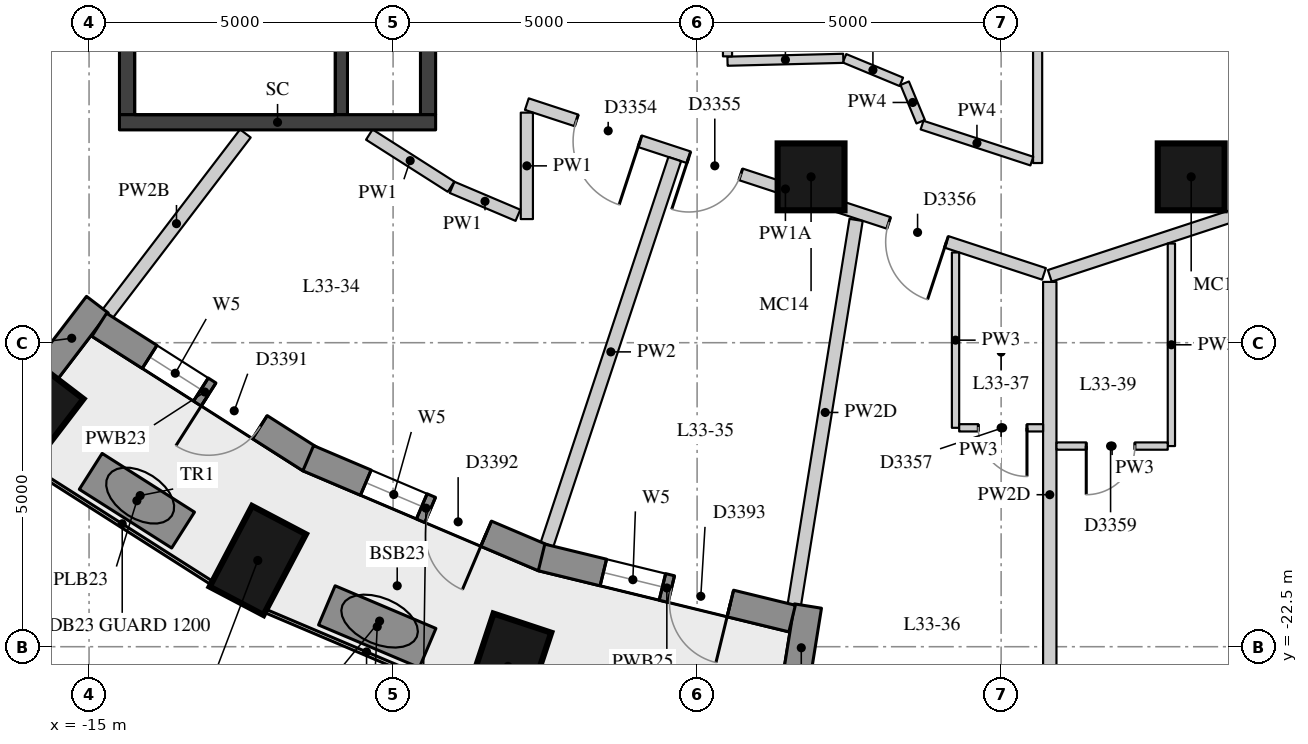
"""IFC4 building model, lengths in metres.
Left out: names, types, materials, properties, quantities, classifications, styles, units other than length and angle.
Written with IfcOpenShell. Run it as: python <this file> out.ifc"""

import sys

from ifc_helpers import new_model, si_unit, direction, frame, frame_2d, origin, origin_2d, place, context, subcontext, project, spatial, rectangle, extrude, element, fill, save


model = new_model("IFC4")
c1 = context("Model", 3, precision=1e-05, world=origin(), true_north=direction((0.0, 1.0)))
c2 = subcontext(c1, "Body", "Model", "MODEL_VIEW")
j1 = project(units=[si_unit("LENGTHUNIT", "METRE"), si_unit("PLANEANGLEUNIT", "RADIAN")], contexts=[c1])
p1 = place(None, origin())
s1 = spatial("IfcSite", under=j1, at=p1, CompositionType="ELEMENT")
p2 = place(p1, origin())
s2 = spatial("IfcBuilding", under=s1, at=p2, CompositionType="ELEMENT")
p3 = place(p2, frame((0.0, 0.0, 118.6)))
s3 = spatial("IfcBuildingStorey", under=s2, at=p3, CompositionType="ELEMENT", Elevation=118.6)
for number, where, z_axis, x_axis in (
    (1, (-15.945, -18.717, 0.0), (0.0, 0.0, 1.0), (-0.607, -0.795, 0.0)),
    (2, (-12.225, -21.082, 0.0), (0.0, 0.0, 1.0), (-0.465, -0.885, 0.0)),
    (3, (-8.11, -22.824, 0.0), (0.0, 0.0, 1.0), (-0.315, -0.949, 0.0)),
):
    element("IfcColumn", number, at=place(p3, frame(where, z_axis=z_axis, x_axis=x_axis)), inside=s3, PredefinedType="COLUMN", context=c2, shape_type="SweptSolid", body=[
        extrude(rectangle(XDim=1.5, YDim=1.0, at=origin_2d()), origin(), (0.0, 0.0, 1.0), 3.3),
    ])
for number, where, z_axis, x_axis in (
    (4, (-3.126, -14.772, 0.0), (0.0, 0.0, 1.0), (1.0, 0.0, 0.0)),
    (5, (3.126, -14.772, 0.0), (0.0, 0.0, 1.0), (1.0, 0.0, 0.0)),
):
    element("IfcColumn", number, at=place(p3, frame(where, z_axis=z_axis, x_axis=x_axis)), inside=s3, PredefinedType="COLUMN", context=c2, shape_type="SweptSolid", body=[
        extrude(rectangle(XDim=1.1, YDim=1.1, at=origin_2d()), origin(), (0.0, 0.0, 1.0), 3.3),
    ])
p4 = place(p3, frame((-15.708, -17.979, 0.0), z_axis=(0.0, 0.0, 1.0), x_axis=(0.607026495834, 0.794681592435, 0.0)))
e6 = element("IfcWall", 6, at=p4, inside=s3, PredefinedType="SOLIDWALL", context=c2, shape_type="SweptSolid", body=[
    extrude(rectangle(XDim=1.391, YDim=0.45, at=frame_2d((0.695, 0.0))), origin(), (0.0, 0.0, 1.0), 2.57),
])
p5 = place(p3, frame((-3.397, -23.204, 0.0), z_axis=(0.0, 0.0, 1.0), x_axis=(0.158415168535, 0.987372591466, 0.0)))
e7 = element("IfcWall", 7, at=p5, inside=s3, PredefinedType="SOLIDWALL", context=c2, shape_type="SweptSolid", body=[
    extrude(rectangle(XDim=1.39, YDim=0.45, at=frame_2d((0.695, 0.0))), origin(), (0.0, 0.0, 1.0), 2.47),
])
p6 = place(p3, frame((-14.833, -17.205, 0.0), z_axis=(0.0, 0.0, 1.0), x_axis=(0.843255766903, -0.537512522259, 0.0)))
e8 = element("IfcWall", 8, at=p6, inside=s3, PredefinedType="SOLIDWALL", context=c2, shape_type="SweptSolid", body=[
    extrude(rectangle(XDim=4.115, YDim=0.45, at=frame_2d((2.058, 0.0))), origin(), (0.0, 0.0, 1.0), 3.02),
])
p7 = place(p6, frame((0.983, 0.0, 0.4)))
e9 = element("IfcOpeningElement", 9, at=p7, cuts=e8, PredefinedType="OPENING", context=c2, shape_type="SweptSolid", body=[
    extrude(rectangle(XDim=1.0, YDim=1.75, at=frame_2d((0.5, 0.875))), frame((0.0, 0.235, 0.0), z_axis=(0.0, -1.0, 0.0), x_axis=(1.0, 0.0, 0.0)), (0.0, 0.0, 1.0), 0.47),
])
p8 = place(p6, frame((2.133, 0.0, 0.0)))
e10 = element("IfcOpeningElement", 10, at=p8, cuts=e8, PredefinedType="OPENING", context=c2, shape_type="SweptSolid", body=[
    extrude(rectangle(XDim=1.0, YDim=2.15, at=frame_2d((0.5, 1.075))), frame((0.0, 0.235, 0.0), z_axis=(0.0, -1.0, 0.0), x_axis=(1.0, 0.0, 0.0)), (0.0, 0.0, 1.0), 0.47),
])
p9 = place(p3, frame((-11.396, -19.399, 0.0), z_axis=(0.0, 0.0, 1.0), x_axis=(0.920496400713, -0.390751041296, 0.0)))
e11 = element("IfcWall", 11, at=p9, inside=s3, PredefinedType="SOLIDWALL", context=c2, shape_type="SweptSolid", body=[
    extrude(rectangle(XDim=4.207, YDim=0.45, at=frame_2d((2.104, 0.0))), origin(), (0.0, 0.0, 1.0), 3.02),
])
p10 = place(p9, frame((1.028, 0.0, 0.4)))
e12 = element("IfcOpeningElement", 12, at=p10, cuts=e11, PredefinedType="OPENING", context=c2, shape_type="SweptSolid", body=[
    extrude(rectangle(XDim=1.0, YDim=1.75, at=frame_2d((0.5, 0.875))), frame((0.0, 0.235, 0.0), z_axis=(0.0, -1.0, 0.0), x_axis=(1.0, 0.0, 0.0)), (0.0, 0.0, 1.0), 0.47),
])
p11 = place(p9, frame((2.178, 0.0, 0.0)))
e13 = element("IfcOpeningElement", 13, at=p11, cuts=e11, PredefinedType="OPENING", context=c2, shape_type="SweptSolid", body=[
    extrude(rectangle(XDim=1.0, YDim=2.15, at=frame_2d((0.5, 1.075))), frame((0.0, 0.235, 0.0), z_axis=(0.0, -1.0, 0.0), x_axis=(1.0, 0.0, 0.0)), (0.0, 0.0, 1.0), 0.47),
])
p12 = place(p3, frame((-7.558, -21.032, 0.0), z_axis=(0.0, 0.0, 1.0), x_axis=(0.971511611373, -0.23699195971, 0.0)))
e14 = element("IfcWall", 14, at=p12, inside=s3, PredefinedType="SOLIDWALL", context=c2, shape_type="SweptSolid", body=[
    extrude(rectangle(XDim=4.241, YDim=0.45, at=frame_2d((2.121, 0.0))), origin(), (0.0, 0.0, 1.0), 3.02),
])
p13 = place(p12, frame((1.046, 0.0, 0.4)))
e15 = element("IfcOpeningElement", 15, at=p13, cuts=e14, PredefinedType="OPENING", context=c2, shape_type="SweptSolid", body=[
    extrude(rectangle(XDim=1.0, YDim=1.75, at=frame_2d((0.5, 0.875))), frame((0.0, 0.235, 0.0), z_axis=(0.0, -1.0, 0.0), x_axis=(1.0, 0.0, 0.0)), (0.0, 0.0, 1.0), 0.47),
])
p14 = place(p12, frame((2.196, 0.0, 0.0)))
e16 = element("IfcOpeningElement", 16, at=p14, cuts=e14, PredefinedType="OPENING", context=c2, shape_type="SweptSolid", body=[
    extrude(rectangle(XDim=1.0, YDim=2.15, at=frame_2d((0.5, 1.075))), frame((0.0, 0.235, 0.0), z_axis=(0.0, -1.0, 0.0), x_axis=(1.0, 0.0, 0.0)), (0.0, 0.0, 1.0), 0.47),
])
for number, where, z_axis, x_axis in (
    (17, (-14.973, -19.616, 0.0), (0.0, 0.0, 1.0), (0.844, -0.537, 0.0)),
    (18, (-11.09, -21.82, 0.0), (0.0, 0.0, 1.0), (0.921, -0.39, 0.0)),
):
    element("IfcWall", number, at=place(p3, frame(where, z_axis=z_axis, x_axis=x_axis)), inside=s3, PredefinedType="USERDEFINED", context=c2, shape_type="SweptSolid", body=[
        extrude(rectangle(XDim=1.8, YDim=0.7, at=frame_2d((0.9, 0.0))), origin(), (0.0, 0.0, 1.0), 0.75),
    ])
p15 = place(p3, frame((-10.85, -13.75, 0.0), z_axis=(0.0, 0.0, 1.0), x_axis=(0.0, 1.0, 0.0)))
e19 = element("IfcWall", 19, at=p15, inside=s3, PredefinedType="SHEAR", context=c2, shape_type="SweptSolid", body=[
    extrude(rectangle(XDim=6.0, YDim=0.2, at=frame_2d((3.0, 0.0))), origin(), (0.0, 0.0, 1.0), 3.02),
])
p16 = place(p15, frame((4.4, 0.0, 0.0)))
e20 = element("IfcOpeningElement", 20, at=p16, cuts=e19, PredefinedType="OPENING", context=c2, shape_type="SweptSolid", body=[
    extrude(rectangle(XDim=1.5, YDim=2.1, at=frame_2d((0.75, 1.05))), frame((0.0, 0.11, 0.0), z_axis=(0.0, -1.0, 0.0), x_axis=(1.0, 0.0, 0.0)), (0.0, 0.0, 1.0), 0.22),
])
p17 = place(p3, frame((-14.375, -13.75, -0.28), z_axis=(0.0, 0.0, 1.0), x_axis=(0.0, 1.0, 0.0)))
e21 = element("IfcWall", 21, at=p17, inside=s3, PredefinedType="SHEAR", context=c2, shape_type="SweptSolid", body=[
    extrude(rectangle(XDim=6.0, YDim=0.25, at=frame_2d((3.0, 0.0))), origin(), (0.0, 0.0, 1.0), 3.3),
])
p18 = place(p3, frame((-9.425, -13.75, -0.28), z_axis=(0.0, 0.0, 1.0), x_axis=(0.0, 1.0, 0.0)))
e22 = element("IfcWall", 22, at=p18, inside=s3, PredefinedType="SHEAR", context=c2, shape_type="SweptSolid", body=[
    extrude(rectangle(XDim=6.0, YDim=0.25, at=frame_2d((3.0, 0.0))), origin(), (0.0, 0.0, 1.0), 3.3),
])
p19 = place(p18, frame((2.4, 0.0, 0.28)))
e23 = element("IfcOpeningElement", 23, at=p19, cuts=e22, PredefinedType="OPENING", context=c2, shape_type="SweptSolid", body=[
    extrude(rectangle(XDim=1.5, YDim=2.1, at=frame_2d((0.75, 1.05))), frame((0.0, 0.135, 0.0), z_axis=(0.0, -1.0, 0.0), x_axis=(1.0, 0.0, 0.0)), (0.0, 0.0, 1.0), 0.27),
])
p20 = place(p3, frame((-14.5, -13.875, -0.28), z_axis=(0.0, 0.0, 1.0), x_axis=(1.0, 0.0, 0.0)))
e24 = element("IfcWall", 24, at=p20, inside=s3, PredefinedType="SHEAR", context=c2, shape_type="SweptSolid", body=[
    extrude(rectangle(XDim=5.2, YDim=0.25, at=frame_2d((2.6, 0.0))), origin(), (0.0, 0.0, 1.0), 3.3),
])
p21 = place(p3, frame((8.984, -13.713, 0.0), z_axis=(0.0, 0.0, 1.0), x_axis=(-0.950093687873, -0.311964716378, 0.0)))
e25 = element("IfcWall", 25, at=p21, inside=s3, PredefinedType="PARTITIONING", context=c2, shape_type="SweptSolid", body=[
    extrude(rectangle(XDim=8.614, YDim=0.2, at=frame_2d((4.307, 0.0))), origin(), (0.0, 0.0, 1.0), 3.02),
])
p22 = place(p21, frame((3.82, 0.0, 0.0)))
e26 = element("IfcOpeningElement", 26, at=p22, cuts=e25, PredefinedType="OPENING", context=c2, shape_type="SweptSolid", body=[
    extrude(rectangle(XDim=1.1, YDim=2.1, at=frame_2d((0.55, 1.05))), frame((0.0, 0.11, 0.0), z_axis=(0.0, -1.0, 0.0), x_axis=(1.0, 0.0, 0.0)), (0.0, 0.0, 1.0), 0.22),
])
p23 = place(p21, frame((0.22, 0.0, 0.0)))
e27 = element("IfcOpeningElement", 27, at=p23, cuts=e25, PredefinedType="OPENING", context=c2, shape_type="SweptSolid", body=[
    extrude(rectangle(XDim=1.1, YDim=2.1, at=frame_2d((0.55, 1.05))), frame((0.0, 0.11, 0.0), z_axis=(0.0, -1.0, 0.0), x_axis=(1.0, 0.0, 0.0)), (0.0, 0.0, 1.0), 0.22),
])
p24 = place(p3, frame((0.705, -16.368, 0.0), z_axis=(0.0, 0.0, 1.0), x_axis=(-0.95010544032, 0.311928921832, 0.0)))
e28 = element("IfcWall", 28, at=p24, inside=s3, PredefinedType="PARTITIONING", context=c2, shape_type="SweptSolid", body=[
    extrude(rectangle(XDim=8.951, YDim=0.2, at=frame_2d((4.476, 0.0))), origin(), (0.0, 0.0, 1.0), 2.57),
])
p25 = place(p24, frame((6.993, 0.0, 0.0)))
e29 = element("IfcOpeningElement", 29, at=p25, cuts=e28, PredefinedType="OPENING", context=c2, shape_type="SweptSolid", body=[
    extrude(rectangle(XDim=1.1, YDim=2.1, at=frame_2d((0.55, 1.05))), frame((0.0, 0.11, 0.0), z_axis=(0.0, -1.0, 0.0), x_axis=(1.0, 0.0, 0.0)), (0.0, 0.0, 1.0), 0.22),
])
p26 = place(p24, frame((5.248, 0.0, 0.0)))
e30 = element("IfcOpeningElement", 30, at=p26, cuts=e28, PredefinedType="OPENING", context=c2, shape_type="SweptSolid", body=[
    extrude(rectangle(XDim=0.9, YDim=2.1, at=frame_2d((0.45, 1.05))), frame((0.0, 0.11, 0.0), z_axis=(0.0, -1.0, 0.0), x_axis=(1.0, 0.0, 0.0)), (0.0, 0.0, 1.0), 0.22),
])
p27 = place(p24, frame((1.688, 0.0, 0.0)))
e31 = element("IfcOpeningElement", 31, at=p27, cuts=e28, PredefinedType="OPENING", context=c2, shape_type="SweptSolid", body=[
    extrude(rectangle(XDim=1.0, YDim=2.1, at=frame_2d((0.5, 1.05))), frame((0.0, 0.11, 0.0), z_axis=(0.0, -1.0, 0.0), x_axis=(1.0, 0.0, 0.0)), (0.0, 0.0, 1.0), 0.22),
])
p28 = place(p3, frame((-7.8, -13.716, 0.0), z_axis=(0.0, 0.0, 1.0), x_axis=(0.0, -1.0, 0.0)))
e32 = element("IfcWall", 32, at=p28, inside=s3, PredefinedType="PARTITIONING", context=c2, shape_type="SweptSolid", body=[
    extrude(rectangle(XDim=1.751, YDim=0.2, at=frame_2d((0.875, 0.0))), origin(), (0.0, 0.0, 1.0), 3.02),
])
p29 = place(p3, frame((-7.947, -15.404, 0.0), z_axis=(0.0, 0.0, 1.0), x_axis=(-0.920608906038, 0.390485905153, 0.0)))
e33 = element("IfcWall", 33, at=p29, inside=s3, PredefinedType="PARTITIONING", context=c2, shape_type="SweptSolid", body=[
    extrude(rectangle(XDim=1.177, YDim=0.2, at=frame_2d((0.588, 0.0))), origin(), (0.0, 0.0, 1.0), 3.02),
])
p30 = place(p3, frame((-9.047, -14.934, 0.0), z_axis=(0.0, 0.0, 1.0), x_axis=(-0.843232404468, 0.537549171755, 0.0)))
e34 = element("IfcWall", 34, at=p30, inside=s3, PredefinedType="PARTITIONING", context=c2, shape_type="SweptSolid", body=[
    extrude(rectangle(XDim=1.594, YDim=0.2, at=frame_2d((0.797, 0.0))), origin(), (0.0, 0.0, 1.0), 3.02),
])
p31 = place(p3, frame((0.6, -9.23, 0.0), z_axis=(0.0, 0.0, 1.0), x_axis=(0.0, -1.0, 0.0)))
e35 = element("IfcWall", 35, at=p31, inside=s3, PredefinedType="PARTITIONING", context=c2, shape_type="SweptSolid", body=[
    extrude(rectangle(XDim=5.315, YDim=0.15, at=frame_2d((2.657, 0.0))), origin(), (0.0, 0.0, 1.0), 3.02),
])
p32 = place(p3, frame((0.505, -14.513, 0.0), z_axis=(0.0, 0.0, 1.0), x_axis=(-0.950175898888, 0.31171422998, 0.0)))
e36 = element("IfcWall", 36, at=p32, inside=s3, PredefinedType="PARTITIONING", context=c2, shape_type="SweptSolid", body=[
    extrude(rectangle(XDim=1.9, YDim=0.15, at=frame_2d((0.95, 0.0))), origin(), (0.0, 0.0, 1.0), 3.02),
])
p33 = place(p3, frame((-1.323, -13.865, 0.0), z_axis=(0.0, 0.0, 1.0), x_axis=(-0.382970536008, 0.923760558018, 0.0)))
e37 = element("IfcWall", 37, at=p33, inside=s3, PredefinedType="PARTITIONING", context=c2, shape_type="SweptSolid", body=[
    extrude(rectangle(XDim=0.685, YDim=0.15, at=frame_2d((0.343, 0.0))), origin(), (0.0, 0.0, 1.0), 3.02),
])
p34 = place(p3, frame((-1.641, -13.209, 0.0), z_axis=(0.0, 0.0, 1.0), x_axis=(-0.923725449546, 0.383055209937, 0.0)))
e38 = element("IfcWall", 38, at=p34, inside=s3, PredefinedType="PARTITIONING", context=c2, shape_type="SweptSolid", body=[
    extrude(rectangle(XDim=1.011, YDim=0.15, at=frame_2d((0.506, 0.0))), origin(), (0.0, 0.0, 1.0), 3.02),
])
p35 = place(p3, frame((-2.596, -12.823, 0.0), z_axis=(0.0, 0.0, 1.0), x_axis=(-0.999684436087, -0.025120275573, 0.0)))
e39 = element("IfcWall", 39, at=p35, inside=s3, PredefinedType="PARTITIONING", context=c2, shape_type="SweptSolid", body=[
    extrude(rectangle(XDim=1.905, YDim=0.15, at=frame_2d((0.952, 0.0))), origin(), (0.0, 0.0, 1.0), 3.02),
])
p36 = place(p3, frame((-4.5, -12.79, 0.0), z_axis=(0.0, 0.0, 1.0), x_axis=(0.0, 1.0, 0.0)))
e40 = element("IfcWall", 40, at=p36, inside=s3, PredefinedType="PARTITIONING", context=c2, shape_type="SweptSolid", body=[
    extrude(rectangle(XDim=4.307, YDim=0.15, at=frame_2d((2.154, 0.0))), origin(), (0.0, 0.0, 1.0), 3.02),
])
p37 = place(p3, frame((-14.696, -17.025, 0.0), z_axis=(0.0, 0.0, 1.0), x_axis=(0.607059278405, 0.794656550028, 0.0)))
e41 = element("IfcWall", 41, at=p37, inside=s3, PredefinedType="PARTITIONING", context=c2, shape_type="SweptSolid", body=[
    extrude(rectangle(XDim=3.734, YDim=0.22, at=frame_2d((1.867, 0.0))), origin(), (0.0, 0.0, 1.0), 2.57),
])
p38 = place(p3, frame((-7.469, -20.822, 0.0), z_axis=(0.0, 0.0, 1.0), x_axis=(0.314560923857, 0.949237286026, 0.0)))
e42 = element("IfcWall", 42, at=p38, inside=s3, PredefinedType="PARTITIONING", context=c2, shape_type="SweptSolid", body=[
    extrude(rectangle(XDim=6.681, YDim=0.22, at=frame_2d((3.34, 0.0))), origin(), (0.0, 0.0, 1.0), 3.02),
])
p39 = place(p3, frame((-3.402, -21.814, 0.0), z_axis=(0.0, 0.0, 1.0), x_axis=(0.158514453841, 0.987356656899, 0.0)))
e43 = element("IfcWall", 43, at=p39, inside=s3, PredefinedType="PARTITIONING", context=c2, shape_type="SweptSolid", body=[
    extrude(rectangle(XDim=6.415, YDim=0.22, at=frame_2d((3.208, 0.0))), origin(), (0.0, 0.0, 1.0), 2.47),
])
p40 = place(p3, frame((0.8, -23.5, 0.0), z_axis=(0.0, 0.0, 1.0), x_axis=(0.0, 1.0, 0.0)))
e44 = element("IfcWall", 44, at=p40, inside=s3, PredefinedType="PARTITIONING", context=c2, shape_type="SweptSolid", body=[
    extrude(rectangle(XDim=7.0, YDim=0.22, at=frame_2d((3.5, 0.0))), origin(), (0.0, 0.0, 1.0), 2.47),
])
p41 = place(p3, frame((-0.75, -16.016, 0.0), z_axis=(0.0, 0.0, 1.0), x_axis=(0.0, -1.0, 0.0)))
e45 = element("IfcWall", 45, at=p41, inside=s3, PredefinedType="PARTITIONING", context=c2, shape_type="SweptSolid", body=[
    extrude(rectangle(XDim=2.884, YDim=0.12, at=frame_2d((1.442, 0.0))), origin(), (0.0, 0.0, 1.0), 3.02),
])
p42 = place(p3, frame((2.8, -15.868, 0.0), z_axis=(0.0, 0.0, 1.0), x_axis=(0.0, -1.0, 0.0)))
e46 = element("IfcWall", 46, at=p42, inside=s3, PredefinedType="PARTITIONING", context=c2, shape_type="SweptSolid", body=[
    extrude(rectangle(XDim=3.332, YDim=0.12, at=frame_2d((1.666, 0.0))), origin(), (0.0, 0.0, 1.0), 3.02),
])
p43 = place(p3, frame((-0.69, -18.9, 0.0), z_axis=(0.0, 0.0, 1.0), x_axis=(1.0, 0.0, 0.0)))
e47 = element("IfcWall", 47, at=p43, inside=s3, PredefinedType="PARTITIONING", context=c2, shape_type="SweptSolid", body=[
    extrude(rectangle(XDim=1.38, YDim=0.12, at=frame_2d((0.69, 0.0))), origin(), (0.0, 0.0, 1.0), 3.02),
])
p44 = place(p43, frame((0.315, 0.0, 0.0)))
e48 = element("IfcOpeningElement", 48, at=p44, cuts=e47, PredefinedType="OPENING", context=c2, shape_type="SweptSolid", body=[
    extrude(rectangle(XDim=0.8, YDim=2.1, at=frame_2d((0.4, 1.05))), frame((0.0, 0.07, 0.0), z_axis=(0.0, -1.0, 0.0), x_axis=(1.0, 0.0, 0.0)), (0.0, 0.0, 1.0), 0.14),
])
p45 = place(p3, frame((2.74, -19.2, 0.0), z_axis=(0.0, 0.0, 1.0), x_axis=(-1.0, 0.0, 0.0)))
e49 = element("IfcWall", 49, at=p45, inside=s3, PredefinedType="PARTITIONING", context=c2, shape_type="SweptSolid", body=[
    extrude(rectangle(XDim=1.83, YDim=0.12, at=frame_2d((0.915, 0.0))), origin(), (0.0, 0.0, 1.0), 3.02),
])
p46 = place(p45, frame((0.54, 0.0, 0.0)))
e50 = element("IfcOpeningElement", 50, at=p46, cuts=e49, PredefinedType="OPENING", context=c2, shape_type="SweptSolid", body=[
    extrude(rectangle(XDim=0.8, YDim=2.1, at=frame_2d((0.4, 1.05))), frame((0.0, 0.07, 0.0), z_axis=(0.0, -1.0, 0.0), x_axis=(1.0, 0.0, 0.0)), (0.0, 0.0, 1.0), 0.14),
])
p47 = place(p7, origin())
e51 = element("IfcWindow", 51, at=p47, inside=s3, PartitioningType="SINGLE_PANEL", PredefinedType="WINDOW", context=c2, shape_type="SweptSolid", body=[
    extrude(rectangle(XDim=1.0, YDim=1.75, at=frame_2d((0.5, 0.875))), frame((0.0, 0.035, 0.0), z_axis=(0.0, -1.0, 0.0), x_axis=(1.0, 0.0, 0.0)), (0.0, 0.0, 1.0), 0.06),
])
fill(e9, e51)
p48 = place(p8, frame((1.0, 0.0, 0.0), z_axis=(0.0, 0.0, 1.0), x_axis=(-1.0, 0.0, 0.0)))
e52 = element("IfcDoor", 52, at=p48, inside=s3, OperationType="SINGLE_SWING_RIGHT", PredefinedType="DOOR", context=c2, shape_type="SweptSolid", body=[
    extrude(rectangle(XDim=1.0, YDim=2.15, at=frame_2d((0.5, 1.075))), frame((0.0, 0.075, 0.0), z_axis=(0.0, -1.0, 0.0), x_axis=(1.0, 0.0, 0.0)), (0.0, 0.0, 1.0), 0.05),
])
fill(e10, e52)
p49 = place(p10, origin())
e53 = element("IfcWindow", 53, at=p49, inside=s3, PartitioningType="SINGLE_PANEL", PredefinedType="WINDOW", context=c2, shape_type="SweptSolid", body=[
    extrude(rectangle(XDim=1.0, YDim=1.75, at=frame_2d((0.5, 0.875))), frame((0.0, 0.035, 0.0), z_axis=(0.0, -1.0, 0.0), x_axis=(1.0, 0.0, 0.0)), (0.0, 0.0, 1.0), 0.06),
])
fill(e12, e53)
p50 = place(p11, frame((1.0, 0.0, 0.0), z_axis=(0.0, 0.0, 1.0), x_axis=(-1.0, 0.0, 0.0)))
e54 = element("IfcDoor", 54, at=p50, inside=s3, OperationType="SINGLE_SWING_LEFT", PredefinedType="DOOR", context=c2, shape_type="SweptSolid", body=[
    extrude(rectangle(XDim=1.0, YDim=2.15, at=frame_2d((0.5, 1.075))), frame((0.0, 0.075, 0.0), z_axis=(0.0, -1.0, 0.0), x_axis=(1.0, 0.0, 0.0)), (0.0, 0.0, 1.0), 0.05),
])
fill(e13, e54)
p51 = place(p13, origin())
e55 = element("IfcWindow", 55, at=p51, inside=s3, PartitioningType="SINGLE_PANEL", PredefinedType="WINDOW", context=c2, shape_type="SweptSolid", body=[
    extrude(rectangle(XDim=1.0, YDim=1.75, at=frame_2d((0.5, 0.875))), frame((0.0, 0.035, 0.0), z_axis=(0.0, -1.0, 0.0), x_axis=(1.0, 0.0, 0.0)), (0.0, 0.0, 1.0), 0.06),
])
fill(e15, e55)
p52 = place(p14, frame((1.0, 0.0, 0.0), z_axis=(0.0, 0.0, 1.0), x_axis=(-1.0, 0.0, 0.0)))
e56 = element("IfcDoor", 56, at=p52, inside=s3, OperationType="SINGLE_SWING_LEFT", PredefinedType="DOOR", context=c2, shape_type="SweptSolid", body=[
    extrude(rectangle(XDim=1.0, YDim=2.15, at=frame_2d((0.5, 1.075))), frame((0.0, 0.075, 0.0), z_axis=(0.0, -1.0, 0.0), x_axis=(1.0, 0.0, 0.0)), (0.0, 0.0, 1.0), 0.05),
])
fill(e16, e56)
p53 = place(p25, origin())
e57 = element("IfcDoor", 57, at=p53, inside=s3, OperationType="SINGLE_SWING_LEFT", PredefinedType="DOOR", context=c2, shape_type="SweptSolid", body=[
    extrude(rectangle(XDim=1.1, YDim=2.1, at=frame_2d((0.55, 1.05))), frame((0.0, 0.025, 0.0), z_axis=(0.0, -1.0, 0.0), x_axis=(1.0, 0.0, 0.0)), (0.0, 0.0, 1.0), 0.05),
])
fill(e29, e57)
p54 = place(p26, origin())
e58 = element("IfcDoor", 58, at=p54, inside=s3, OperationType="SINGLE_SWING_RIGHT", PredefinedType="DOOR", context=c2, shape_type="SweptSolid", body=[
    extrude(rectangle(XDim=0.9, YDim=2.1, at=frame_2d((0.45, 1.05))), frame((0.0, 0.025, 0.0), z_axis=(0.0, -1.0, 0.0), x_axis=(1.0, 0.0, 0.0)), (0.0, 0.0, 1.0), 0.05),
])
fill(e30, e58)
p55 = place(p27, origin())
e59 = element("IfcDoor", 59, at=p55, inside=s3, OperationType="SINGLE_SWING_LEFT", PredefinedType="DOOR", context=c2, shape_type="SweptSolid", body=[
    extrude(rectangle(XDim=1.0, YDim=2.1, at=frame_2d((0.5, 1.05))), frame((0.0, 0.025, 0.0), z_axis=(0.0, -1.0, 0.0), x_axis=(1.0, 0.0, 0.0)), (0.0, 0.0, 1.0), 0.05),
])
fill(e31, e59)
p56 = place(p44, origin())
e60 = element("IfcDoor", 60, at=p56, inside=s3, OperationType="SINGLE_SWING_LEFT", PredefinedType="DOOR", context=c2, shape_type="SweptSolid", body=[
    extrude(rectangle(XDim=0.8, YDim=2.1, at=frame_2d((0.4, 1.05))), frame((0.0, 0.025, 0.0), z_axis=(0.0, -1.0, 0.0), x_axis=(1.0, 0.0, 0.0)), (0.0, 0.0, 1.0), 0.05),
])
fill(e48, e60)
p57 = place(p46, origin())
e61 = element("IfcDoor", 61, at=p57, inside=s3, OperationType="SINGLE_SWING_RIGHT", PredefinedType="DOOR", context=c2, shape_type="SweptSolid", body=[
    extrude(rectangle(XDim=0.8, YDim=2.1, at=frame_2d((0.4, 1.05))), frame((0.0, 0.025, 0.0), z_axis=(0.0, -1.0, 0.0), x_axis=(1.0, 0.0, 0.0)), (0.0, 0.0, 1.0), 0.05),
])
fill(e50, e61)
save(model, sys.argv[1])
